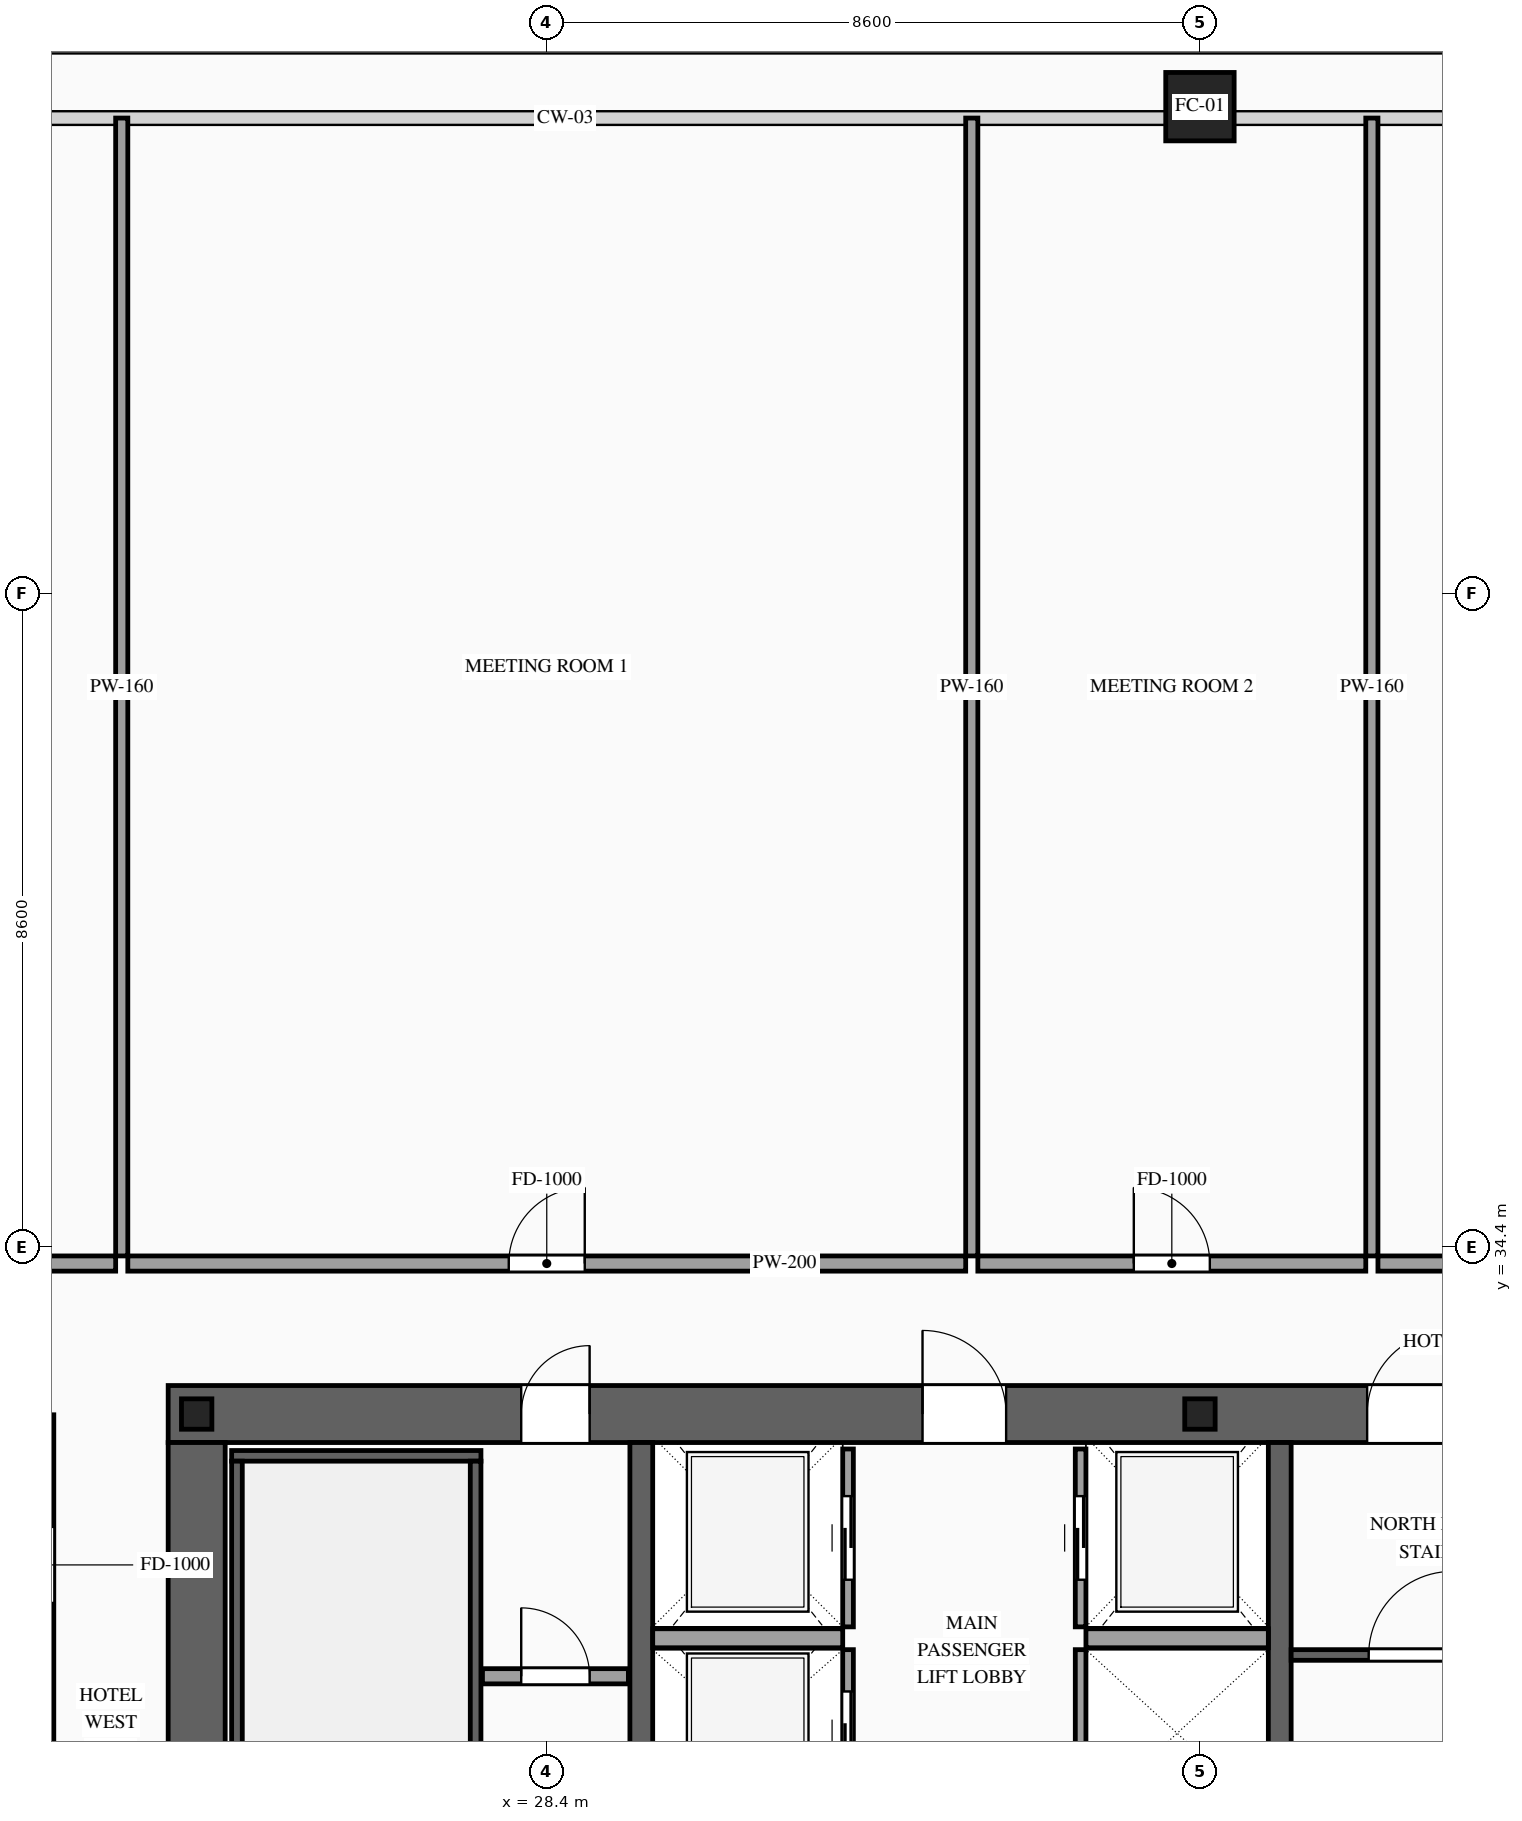
"""IFC4 building model, lengths in metres.
Left out: names, types, materials, properties, quantities, classifications, styles, units other than length and angle.
Written with IfcOpenShell. Run it as: python <this file> out.ifc"""

import sys

from ifc_helpers import new_model, si_unit, direction, frame, frame_2d, origin, origin_2d, place, context, subcontext, project, spatial, rectangle, hollow_rectangle, i_section, extrude, source, transform, mapped, element, fill, save


model = new_model("IFC4")
c1 = context("Model", 3, precision=1e-05, world=origin(), true_north=direction((0.0, 1.0)))
c2 = subcontext(c1, "Body", "Model", "MODEL_VIEW")
j1 = project(units=[si_unit("LENGTHUNIT", "METRE"), si_unit("PLANEANGLEUNIT", "RADIAN")], contexts=[c1])
p1 = place(None, origin())
s1 = spatial("IfcSite", under=j1, at=p1, CompositionType="ELEMENT")
p2 = place(p1, origin())
s2 = spatial("IfcBuilding", under=s1, at=p2, CompositionType="ELEMENT")
p3 = place(p2, frame((0.0, 0.0, 141.6)))
s3 = spatial("IfcBuildingStorey", under=s2, at=p3, CompositionType="ELEMENT", Elevation=141.6)
p4 = place(p3, frame((23.425, 32.2, 0.0), z_axis=(0.0, 0.0, 1.0), x_axis=(1.0, 0.0, 0.0)))
e1 = element("IfcWall", 1, at=p4, inside=s3, PredefinedType="SHEAR", context=c2, shape_type="SweptSolid", body=[
    extrude(rectangle(XDim=27.15, YDim=0.75, at=frame_2d((13.575, 0.0))), origin(), (0.0, 0.0, 1.0), 3.6),
])
p5 = place(p4, frame((4.645, 0.0, 0.0)))
e2 = element("IfcOpeningElement", 2, at=p5, cuts=e1, PredefinedType="OPENING", context=c2, shape_type="SweptSolid", body=[
    extrude(rectangle(XDim=0.9, YDim=2.15, at=frame_2d((0.45, 1.075))), frame((0.0, 0.39, 0.0), z_axis=(0.0, -1.0, 0.0), x_axis=(1.0, 0.0, 0.0)), (0.0, 0.0, 1.0), 0.78),
])
p6 = place(p4, frame((9.925, 0.0, 0.0)))
e3 = element("IfcOpeningElement", 3, at=p6, cuts=e1, PredefinedType="OPENING", context=c2, shape_type="SweptSolid", body=[
    extrude(rectangle(XDim=1.1, YDim=2.2, at=frame_2d((0.55, 1.1))), frame((0.0, 0.39, 0.0), z_axis=(0.0, -1.0, 0.0), x_axis=(1.0, 0.0, 0.0)), (0.0, 0.0, 1.0), 0.78),
])
p7 = place(p4, frame((15.775, 0.0, 0.0)))
e4 = element("IfcOpeningElement", 4, at=p7, cuts=e1, PredefinedType="OPENING", context=c2, shape_type="SweptSolid", body=[
    extrude(rectangle(XDim=1.1, YDim=2.2, at=frame_2d((0.55, 1.1))), frame((0.0, 0.39, 0.0), z_axis=(0.0, -1.0, 0.0), x_axis=(1.0, 0.0, 0.0)), (0.0, 0.0, 1.0), 0.78),
])
p8 = place(p4, frame((18.975, 0.0, 0.0)))
e5 = element("IfcOpeningElement", 5, at=p8, cuts=e1, PredefinedType="OPENING", context=c2, shape_type="SweptSolid", body=[
    extrude(rectangle(XDim=0.9, YDim=2.15, at=frame_2d((0.45, 1.075))), frame((0.0, 0.39, 0.0), z_axis=(0.0, -1.0, 0.0), x_axis=(1.0, 0.0, 0.0)), (0.0, 0.0, 1.0), 0.78),
])
m1 = source(origin(), c2, "Body", "SweptSolid", [
    extrude(rectangle(XDim=12.05, YDim=0.75, at=frame_2d((6.025, 0.0))), origin(), (0.0, 0.0, 1.0), 3.6),
])
p9 = place(p3, frame((23.8, 19.775, 0.0), z_axis=(0.0, 0.0, 1.0), x_axis=(0.0, 1.0, 0.0)))
e6 = element("IfcWall", 6, at=p9, inside=s3, PredefinedType="SHEAR", context=c2, shape_type="MappedRepresentation", body=[
    mapped(m1, transform((0.0, 0.0, 0.0), scale=1.0)),
])
m2 = source(origin(), c2, "Body", "SweptSolid", [
    extrude(rectangle(XDim=12.05, YDim=0.3, at=frame_2d((6.025, 0.0))), origin(), (0.0, 0.0, 1.0), 3.6),
])
for number, where, z_axis, x_axis in (
    (7, (29.65, 19.775, 0.0), (0.0, 0.0, 1.0), (0.0, 1.0, 0.0)),
    (8, (38.05, 19.775, 0.0), (0.0, 0.0, 1.0), (0.0, 1.0, 0.0)),
):
    element("IfcWall", number, at=place(p3, frame(where, z_axis=z_axis, x_axis=x_axis)), inside=s3, PredefinedType="SOLIDWALL", context=c2, shape_type="MappedRepresentation", body=[
        mapped(m2, transform((0.0, 0.0, 0.0), scale=1.0)),
    ])
m3 = source(origin(), c2, "Body", "SweptSolid", [
    extrude(i_section(OverallWidth=0.4, OverallDepth=0.4, WebThickness=0.013, FlangeThickness=0.021, at=origin_2d()), origin(), (0.0, 0.0, 1.0), 3.6),
])
for number, where, z_axis, x_axis in (
    (9, (23.8, 32.2, 0.0), (0.0, 0.0, 1.0), (1.0, 0.0, 0.0)),
    (10, (37.0, 32.2, 0.0), (0.0, 0.0, 1.0), (1.0, 0.0, 0.0)),
):
    element("IfcColumn", number, at=place(p3, frame(where, z_axis=z_axis, x_axis=x_axis)), inside=s3, PredefinedType="COLUMN", context=c2, shape_type="MappedRepresentation", body=[
        mapped(m3, transform((0.0, 0.0, 0.0), scale=1.0)),
    ])
m4 = source(origin(), c2, "Body", "SweptSolid", [
    extrude(hollow_rectangle(XDim=0.9, YDim=0.9, WallThickness=0.042, at=origin_2d()), origin(), (0.0, 0.0, 1.0), 3.6),
])
p10 = place(p3, frame((37.0, 49.4, 0.0), z_axis=(0.0, 0.0, 1.0), x_axis=(1.0, 0.0, 0.0)))
e11 = element("IfcColumn", 11, at=p10, inside=s3, PredefinedType="COLUMN", context=c2, shape_type="MappedRepresentation", body=[
    mapped(m4, transform((0.0, 0.0, 0.0), scale=1.0)),
])
p11 = place(p3, frame((32.37, 26.9, 0.0), z_axis=(0.0, 0.0, 1.0), x_axis=(0.0, 1.0, 0.0)))
e12 = element("IfcWall", 12, at=p11, inside=s3, PredefinedType="SOLIDWALL", context=c2, shape_type="SweptSolid", body=[
    extrude(rectangle(XDim=2.2, YDim=0.14, at=frame_2d((1.1, 0.0))), origin(), (0.0, 0.0, 1.0), 3.38),
])
p12 = place(p11, frame((0.55, 0.0, 0.0)))
e13 = element("IfcOpeningElement", 13, at=p12, cuts=e12, PredefinedType="OPENING", context=c2, shape_type="SweptSolid", body=[
    extrude(rectangle(XDim=1.1, YDim=2.2, at=frame_2d((0.55, 1.1))), frame((0.0, 0.085, 0.0), z_axis=(0.0, -1.0, 0.0), x_axis=(1.0, 0.0, 0.0)), (0.0, 0.0, 1.0), 0.17),
])
p13 = place(p3, frame((32.37, 29.4, 0.0), z_axis=(0.0, 0.0, 1.0), x_axis=(0.0, 1.0, 0.0)))
e14 = element("IfcWall", 14, at=p13, inside=s3, PredefinedType="SOLIDWALL", context=c2, shape_type="SweptSolid", body=[
    extrude(rectangle(XDim=2.34, YDim=0.14, at=frame_2d((1.17, 0.0))), origin(), (0.0, 0.0, 1.0), 3.38),
])
p14 = place(p13, frame((0.62, 0.0, 0.0)))
e15 = element("IfcOpeningElement", 15, at=p14, cuts=e14, PredefinedType="OPENING", context=c2, shape_type="SweptSolid", body=[
    extrude(rectangle(XDim=1.1, YDim=2.2, at=frame_2d((0.55, 1.1))), frame((0.0, 0.085, 0.0), z_axis=(0.0, -1.0, 0.0), x_axis=(1.0, 0.0, 0.0)), (0.0, 0.0, 1.0), 0.17),
])
m5 = source(origin(), c2, "Body", "SweptSolid", [
    extrude(rectangle(XDim=2.5, YDim=0.25, at=frame_2d((1.25, 0.0))), origin(), (0.0, 0.0, 1.0), 3.38),
])
p15 = place(p3, frame((29.8, 29.25, 0.0), z_axis=(0.0, 0.0, 1.0), x_axis=(1.0, 0.0, 0.0)))
e16 = element("IfcWall", 16, at=p15, inside=s3, PredefinedType="SOLIDWALL", context=c2, shape_type="MappedRepresentation", body=[
    mapped(m5, transform((0.0, 0.0, 0.0), scale=1.0)),
])
m6 = source(origin(), c2, "Body", "SweptSolid", [
    extrude(rectangle(XDim=2.2, YDim=0.14, at=frame_2d((1.1, 0.0))), origin(), (0.0, 0.0, 1.0), 3.38),
])
p16 = place(p3, frame((35.43, 26.9, 0.0), z_axis=(0.0, 0.0, 1.0), x_axis=(0.0, 1.0, 0.0)))
e17 = element("IfcWall", 17, at=p16, inside=s3, PredefinedType="SOLIDWALL", context=c2, shape_type="MappedRepresentation", body=[
    mapped(m6, transform((0.0, 0.0, 0.0), scale=1.0)),
])
p17 = place(p3, frame((35.43, 29.4, 0.0), z_axis=(0.0, 0.0, 1.0), x_axis=(0.0, 1.0, 0.0)))
e18 = element("IfcWall", 18, at=p17, inside=s3, PredefinedType="SOLIDWALL", context=c2, shape_type="SweptSolid", body=[
    extrude(rectangle(XDim=2.34, YDim=0.14, at=frame_2d((1.17, 0.0))), origin(), (0.0, 0.0, 1.0), 3.38),
])
p18 = place(p17, frame((0.62, 0.0, 0.0)))
e19 = element("IfcOpeningElement", 19, at=p18, cuts=e18, PredefinedType="OPENING", context=c2, shape_type="SweptSolid", body=[
    extrude(rectangle(XDim=1.1, YDim=2.2, at=frame_2d((0.55, 1.1))), frame((0.0, 0.085, 0.0), z_axis=(0.0, -1.0, 0.0), x_axis=(1.0, 0.0, 0.0)), (0.0, 0.0, 1.0), 0.17),
])
m7 = source(origin(), c2, "Body", "SweptSolid", [
    extrude(rectangle(XDim=2.4, YDim=0.25, at=frame_2d((1.2, 0.0))), origin(), (0.0, 0.0, 1.0), 3.38),
])
p19 = place(p3, frame((35.5, 29.25, 0.0), z_axis=(0.0, 0.0, 1.0), x_axis=(1.0, 0.0, 0.0)))
e20 = element("IfcWall", 20, at=p19, inside=s3, PredefinedType="SOLIDWALL", context=c2, shape_type="MappedRepresentation", body=[
    mapped(m7, transform((0.0, 0.0, 0.0), scale=1.0)),
])
m8 = source(origin(), c2, "Body", "SweptSolid", [
    extrude(rectangle(XDim=3.28, YDim=0.14, at=frame_2d((1.64, 0.0))), origin(), (0.0, 0.0, 1.0), 3.38),
])
p20 = place(p3, frame((24.26, 31.65, 0.0), z_axis=(0.0, 0.0, 1.0), x_axis=(1.0, 0.0, 0.0)))
e21 = element("IfcWall", 21, at=p20, inside=s3, PredefinedType="SOLIDWALL", context=c2, shape_type="MappedRepresentation", body=[
    mapped(m8, transform((0.0, 0.0, 0.0), scale=1.0)),
])
m9 = source(origin(), c2, "Body", "SweptSolid", [
    extrude(rectangle(XDim=8.94, YDim=0.14, at=frame_2d((4.47, 0.0))), origin(), (0.0, 0.0, 1.0), 3.38),
])
for number, where, z_axis, x_axis in (
    (22, (24.33, 22.64, 0.0), (0.0, 0.0, 1.0), (0.0, 1.0, 0.0)),
    (23, (27.47, 22.64, 0.0), (0.0, 0.0, 1.0), (0.0, 1.0, 0.0)),
):
    element("IfcWall", number, at=place(p3, frame(where, z_axis=z_axis, x_axis=x_axis)), inside=s3, PredefinedType="SOLIDWALL", context=c2, shape_type="MappedRepresentation", body=[
        mapped(m9, transform((0.0, 0.0, 0.0), scale=1.0)),
    ])
p21 = place(p3, frame((38.2, 29.03, 0.0), z_axis=(0.0, 0.0, 1.0), x_axis=(1.0, 0.0, 0.0)))
e24 = element("IfcWall", 24, at=p21, inside=s3, PredefinedType="SOLIDWALL", context=c2, shape_type="SweptSolid", body=[
    extrude(rectangle(XDim=3.14, YDim=0.14, at=frame_2d((1.57, 0.0))), origin(), (0.0, 0.0, 1.0), 3.38),
])
p22 = place(p21, frame((1.02, 0.0, 0.0)))
e25 = element("IfcOpeningElement", 25, at=p22, cuts=e24, PredefinedType="OPENING", context=c2, shape_type="SweptSolid", body=[
    extrude(rectangle(XDim=1.1, YDim=2.2, at=frame_2d((0.55, 1.1))), frame((0.0, 0.085, 0.0), z_axis=(0.0, -1.0, 0.0), x_axis=(1.0, 0.0, 0.0)), (0.0, 0.0, 1.0), 0.17),
])
p23 = place(p3, frame((27.56, 28.75, 0.0), z_axis=(0.0, 0.0, 1.0), x_axis=(1.0, 0.0, 0.0)))
e26 = element("IfcWall", 26, at=p23, inside=s3, PredefinedType="PARTITIONING", context=c2, shape_type="SweptSolid", body=[
    extrude(rectangle(XDim=1.92, YDim=0.2, at=frame_2d((0.96, 0.0))), origin(), (0.0, 0.0, 1.0), 3.38),
])
p24 = place(p23, frame((0.51, 0.0, 0.0)))
e27 = element("IfcOpeningElement", 27, at=p24, cuts=e26, PredefinedType="OPENING", context=c2, shape_type="SweptSolid", body=[
    extrude(rectangle(XDim=0.9, YDim=2.15, at=frame_2d((0.45, 1.075))), frame((0.0, 0.115, 0.0), z_axis=(0.0, -1.0, 0.0), x_axis=(1.0, 0.0, 0.0)), (0.0, 0.0, 1.0), 0.23),
])
p25 = place(p3, frame((16.44, 34.18, 0.0), z_axis=(0.0, 0.0, 1.0), x_axis=(1.0, 0.0, 0.0)))
e28 = element("IfcWall", 28, at=p25, inside=s3, PredefinedType="PARTITIONING", context=c2, shape_type="SweptSolid", body=[
    extrude(rectangle(XDim=6.294, YDim=0.2, at=frame_2d((3.147, 0.0))), origin(), (0.0, 0.0, 1.0), 3.38),
])
p26 = place(p25, frame((3.852, 0.0, 0.0)))
e29 = element("IfcOpeningElement", 29, at=p26, cuts=e28, PredefinedType="OPENING", context=c2, shape_type="SweptSolid", body=[
    extrude(rectangle(XDim=1.0, YDim=2.2, at=frame_2d((0.5, 1.1))), frame((0.0, 0.115, 0.0), z_axis=(0.0, -1.0, 0.0), x_axis=(1.0, 0.0, 0.0)), (0.0, 0.0, 1.0), 0.23),
])
m10 = source(origin(), c2, "Body", "SweptSolid", [
    extrude(rectangle(XDim=14.97, YDim=0.16, at=frame_2d((7.485, 0.0))), origin(), (0.0, 0.0, 1.0), 3.38),
])
p27 = place(p3, frame((22.814, 34.28, 0.0), z_axis=(0.0, 0.0, 1.0), x_axis=(0.0, 1.0, 0.0)))
e30 = element("IfcWall", 30, at=p27, inside=s3, PredefinedType="PARTITIONING", context=c2, shape_type="MappedRepresentation", body=[
    mapped(m10, transform((0.0, 0.0, 0.0), scale=1.0)),
])
p28 = place(p3, frame((22.894, 34.18, 0.0), z_axis=(0.0, 0.0, 1.0), x_axis=(1.0, 0.0, 0.0)))
e31 = element("IfcWall", 31, at=p28, inside=s3, PredefinedType="PARTITIONING", context=c2, shape_type="SweptSolid", body=[
    extrude(rectangle(XDim=11.024, YDim=0.2, at=frame_2d((5.512, 0.0))), origin(), (0.0, 0.0, 1.0), 3.38),
])
p29 = place(p28, frame((5.012, 0.0, 0.0)))
e32 = element("IfcOpeningElement", 32, at=p29, cuts=e31, PredefinedType="OPENING", context=c2, shape_type="SweptSolid", body=[
    extrude(rectangle(XDim=1.0, YDim=2.2, at=frame_2d((0.5, 1.1))), frame((0.0, 0.115, 0.0), z_axis=(0.0, -1.0, 0.0), x_axis=(1.0, 0.0, 0.0)), (0.0, 0.0, 1.0), 0.23),
])
p30 = place(p3, frame((33.998, 34.28, 0.0), z_axis=(0.0, 0.0, 1.0), x_axis=(0.0, 1.0, 0.0)))
e33 = element("IfcWall", 33, at=p30, inside=s3, PredefinedType="PARTITIONING", context=c2, shape_type="MappedRepresentation", body=[
    mapped(m10, transform((0.0, 0.0, 0.0), scale=1.0)),
])
p31 = place(p3, frame((34.078, 34.18, 0.0), z_axis=(0.0, 0.0, 1.0), x_axis=(1.0, 0.0, 0.0)))
e34 = element("IfcWall", 34, at=p31, inside=s3, PredefinedType="PARTITIONING", context=c2, shape_type="SweptSolid", body=[
    extrude(rectangle(XDim=5.104, YDim=0.2, at=frame_2d((2.552, 0.0))), origin(), (0.0, 0.0, 1.0), 3.38),
])
p32 = place(p31, frame((2.052, 0.0, 0.0)))
e35 = element("IfcOpeningElement", 35, at=p32, cuts=e34, PredefinedType="OPENING", context=c2, shape_type="SweptSolid", body=[
    extrude(rectangle(XDim=1.0, YDim=2.2, at=frame_2d((0.5, 1.1))), frame((0.0, 0.115, 0.0), z_axis=(0.0, -1.0, 0.0), x_axis=(1.0, 0.0, 0.0)), (0.0, 0.0, 1.0), 0.23),
])
p33 = place(p3, frame((39.262, 34.28, 0.0), z_axis=(0.0, 0.0, 1.0), x_axis=(0.0, 1.0, 0.0)))
e36 = element("IfcWall", 36, at=p33, inside=s3, PredefinedType="PARTITIONING", context=c2, shape_type="MappedRepresentation", body=[
    mapped(m10, transform((0.0, 0.0, 0.0), scale=1.0)),
])
p34 = place(p3, frame((39.342, 34.18, 0.0), z_axis=(0.0, 0.0, 1.0), x_axis=(1.0, 0.0, 0.0)))
e37 = element("IfcWall", 37, at=p34, inside=s3, PredefinedType="PARTITIONING", context=c2, shape_type="SweptSolid", body=[
    extrude(rectangle(XDim=11.024, YDim=0.2, at=frame_2d((5.512, 0.0))), origin(), (0.0, 0.0, 1.0), 3.38),
])
p35 = place(p34, frame((5.012, 0.0, 0.0)))
e38 = element("IfcOpeningElement", 38, at=p35, cuts=e37, PredefinedType="OPENING", context=c2, shape_type="SweptSolid", body=[
    extrude(rectangle(XDim=1.0, YDim=2.2, at=frame_2d((0.5, 1.1))), frame((0.0, 0.115, 0.0), z_axis=(0.0, -1.0, 0.0), x_axis=(1.0, 0.0, 0.0)), (0.0, 0.0, 1.0), 0.23),
])
p36 = place(p3, frame((21.82, 25.88, 0.0), z_axis=(0.0, 0.0, 1.0), x_axis=(0.0, 1.0, 0.0)))
e39 = element("IfcWall", 39, at=p36, inside=s3, PredefinedType="PARTITIONING", context=c2, shape_type="SweptSolid", body=[
    extrude(rectangle(XDim=6.31, YDim=0.2, at=frame_2d((3.155, 0.0))), origin(), (0.0, 0.0, 1.0), 3.38),
])
p37 = place(p36, frame((3.835, 0.0, 0.0)))
e40 = element("IfcOpeningElement", 40, at=p37, cuts=e39, PredefinedType="OPENING", context=c2, shape_type="SweptSolid", body=[
    extrude(rectangle(XDim=1.0, YDim=2.2, at=frame_2d((0.5, 1.1))), frame((0.0, 0.115, 0.0), z_axis=(0.0, -1.0, 0.0), x_axis=(1.0, 0.0, 0.0)), (0.0, 0.0, 1.0), 0.23),
])
m11 = source(origin(), c2, "Body", "SweptSolid", [
    extrude(rectangle(XDim=1.1, YDim=2.2, at=frame_2d((0.55, 1.1))), frame((0.0, 0.025, 0.0), z_axis=(0.0, -1.0, 0.0), x_axis=(1.0, 0.0, 0.0)), (0.0, 0.0, 1.0), 0.05),
])
p38 = place(p12, origin())
e41 = element("IfcDoor", 41, at=p38, inside=s3, OperationType="SLIDING_TO_RIGHT", PredefinedType="DOOR", context=c2, shape_type="MappedRepresentation", body=[
    mapped(m11, transform((0.0, 0.0, 0.0), scale=1.0)),
])
fill(e13, e41)
p39 = place(p14, origin())
e42 = element("IfcDoor", 42, at=p39, inside=s3, OperationType="SLIDING_TO_LEFT", PredefinedType="DOOR", context=c2, shape_type="MappedRepresentation", body=[
    mapped(m11, transform((0.0, 0.0, 0.0), scale=1.0)),
])
fill(e15, e42)
p40 = place(p18, origin())
e43 = element("IfcDoor", 43, at=p40, inside=s3, OperationType="SLIDING_TO_RIGHT", PredefinedType="DOOR", context=c2, shape_type="MappedRepresentation", body=[
    mapped(m11, transform((0.0, 0.0, 0.0), scale=1.0)),
])
fill(e19, e43)
m12 = source(origin(), c2, "Body", "SweptSolid", [
    extrude(rectangle(XDim=1.1, YDim=2.2, at=frame_2d((0.55, 1.1))), frame((0.0, 0.025, 0.0), z_axis=(0.0, -1.0, 0.0), x_axis=(1.0, 0.0, 0.0)), (0.0, 0.0, 1.0), 0.05),
])
p41 = place(p22, origin())
e44 = element("IfcDoor", 44, at=p41, inside=s3, OperationType="SINGLE_SWING_RIGHT", PredefinedType="DOOR", context=c2, shape_type="MappedRepresentation", body=[
    mapped(m12, transform((0.0, 0.0, 0.0), scale=1.0)),
])
fill(e25, e44)
m13 = source(origin(), c2, "Body", "SweptSolid", [
    extrude(rectangle(XDim=0.9, YDim=2.15, at=frame_2d((0.45, 1.075))), frame((0.0, 0.025, 0.0), z_axis=(0.0, -1.0, 0.0), x_axis=(1.0, 0.0, 0.0)), (0.0, 0.0, 1.0), 0.05),
])
p42 = place(p5, origin())
e45 = element("IfcDoor", 45, at=p42, inside=s3, OperationType="SINGLE_SWING_RIGHT", PredefinedType="DOOR", context=c2, shape_type="MappedRepresentation", body=[
    mapped(m13, transform((0.0, 0.0, 0.0), scale=1.0)),
])
fill(e2, e45)
p43 = place(p6, origin())
e46 = element("IfcDoor", 46, at=p43, inside=s3, OperationType="SINGLE_SWING_LEFT", PredefinedType="DOOR", context=c2, shape_type="MappedRepresentation", body=[
    mapped(m12, transform((0.0, 0.0, 0.0), scale=1.0)),
])
fill(e3, e46)
p44 = place(p7, origin())
e47 = element("IfcDoor", 47, at=p44, inside=s3, OperationType="SINGLE_SWING_RIGHT", PredefinedType="DOOR", context=c2, shape_type="MappedRepresentation", body=[
    mapped(m12, transform((0.0, 0.0, 0.0), scale=1.0)),
])
fill(e4, e47)
p45 = place(p24, origin())
e48 = element("IfcDoor", 48, at=p45, inside=s3, OperationType="SINGLE_SWING_LEFT", PredefinedType="DOOR", context=c2, shape_type="MappedRepresentation", body=[
    mapped(m13, transform((0.0, 0.0, 0.0), scale=1.0)),
])
fill(e27, e48)
m14 = source(origin(), c2, "Body", "SweptSolid", [
    extrude(rectangle(XDim=1.0, YDim=2.2, at=frame_2d((0.5, 1.1))), frame((0.0, 0.025, 0.0), z_axis=(0.0, -1.0, 0.0), x_axis=(1.0, 0.0, 0.0)), (0.0, 0.0, 1.0), 0.05),
])
p46 = place(p29, origin())
e49 = element("IfcDoor", 49, at=p46, inside=s3, OperationType="SINGLE_SWING_RIGHT", PredefinedType="DOOR", context=c2, shape_type="MappedRepresentation", body=[
    mapped(m14, transform((0.0, 0.0, 0.0), scale=1.0)),
])
fill(e32, e49)
p47 = place(p32, origin())
e50 = element("IfcDoor", 50, at=p47, inside=s3, OperationType="SINGLE_SWING_LEFT", PredefinedType="DOOR", context=c2, shape_type="MappedRepresentation", body=[
    mapped(m14, transform((0.0, 0.0, 0.0), scale=1.0)),
])
fill(e35, e50)
save(model, sys.argv[1])
